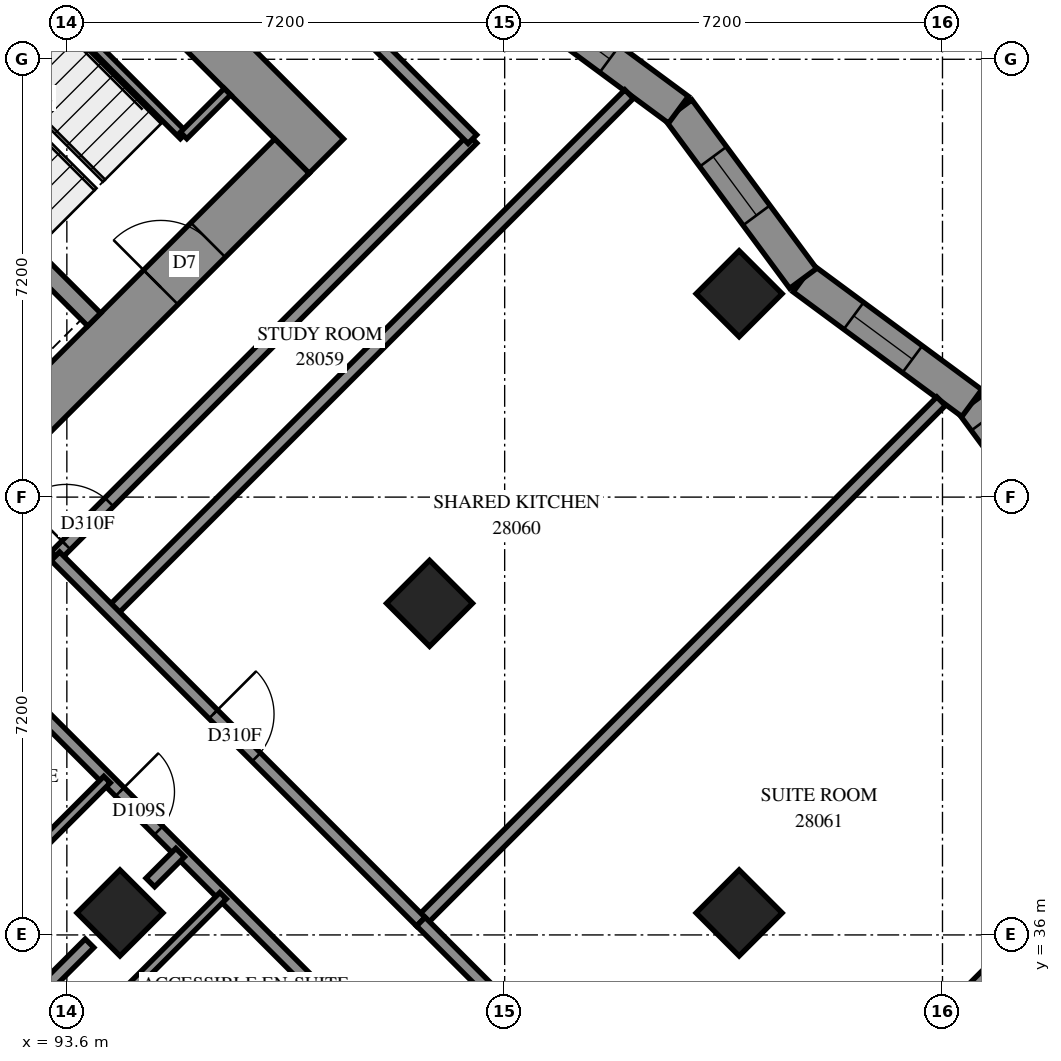
"""IFC4 building model, lengths in metres.
Left out: names, types, materials, properties, quantities, classifications, styles, units other than length and angle.
Written with IfcOpenShell. Run it as: python <this file> out.ifc"""

import sys

from ifc_helpers import new_model, si_unit, direction, frame, frame_2d, origin, origin_2d, place, context, subcontext, project, spatial, polyline, rectangle, outline, extrude, element, fill, save


model = new_model("IFC4")
c1 = context("Model", 3, precision=1e-05, world=origin(), true_north=direction((0.0, 1.0)))
c2 = subcontext(c1, "Body", "Model", "MODEL_VIEW")
j1 = project(units=[si_unit("LENGTHUNIT", "METRE"), si_unit("PLANEANGLEUNIT", "RADIAN")], contexts=[c1])
p1 = place(None, origin())
s1 = spatial("IfcSite", under=j1, at=p1, CompositionType="ELEMENT")
p2 = place(p1, origin())
s2 = spatial("IfcBuilding", under=s1, at=p2, CompositionType="ELEMENT")
p3 = place(p2, frame((0.0, 0.0, 105.0)))
s3 = spatial("IfcBuildingStorey", under=s2, at=p3, CompositionType="ELEMENT", Elevation=105.0)
for number, where, z_axis, x_axis in (
    (1, (104.656, 46.544, 0.0), (0.0, 0.0, 1.0), (0.707, -0.707, 0.0)),
    (2, (99.565, 41.453, 0.0), (0.0, 0.0, 1.0), (0.707, -0.707, 0.0)),
    (3, (94.474, 36.362, 0.0), (0.0, 0.0, 1.0), (0.707, -0.707, 0.0)),
    (4, (104.656, 36.362, 0.0), (0.0, 0.0, 1.0), (0.707, -0.707, 0.0)),
):
    element("IfcColumn", number, at=place(p3, frame(where, z_axis=z_axis, x_axis=x_axis)), inside=s3, PredefinedType="COLUMN", context=c2, shape_type="SweptSolid", body=[
        extrude(rectangle(XDim=1.0, YDim=1.0, at=origin_2d()), origin(), (0.0, 0.0, 1.0), 3.1),
    ])
p4 = place(p3, frame((86.554, 60.121, -0.3), z_axis=(0.0, 0.0, 1.0), x_axis=(0.7071067812, -0.7071067812, 0.0)))
e5 = element("IfcWall", 5, at=p4, inside=s3, PredefinedType="SHEAR", context=c2, shape_type="SweptSolid", body=[
    extrude(rectangle(XDim=16.0, YDim=0.8, at=frame_2d((8.0, 0.0))), origin(), (0.0, 0.0, 1.0), 2.7),
])
p5 = place(p4, frame((10.8, 0.0, 0.3)))
e6 = element("IfcOpeningElement", 6, at=p5, cuts=e5, PredefinedType="OPENING", context=c2, shape_type="SweptSolid", body=[
    extrude(rectangle(XDim=0.8, YDim=2.1, at=frame_2d((0.4, 1.05))), frame((0.0, 0.41, 0.0), z_axis=(0.0, -1.0, 0.0), x_axis=(1.0, 0.0, 0.0)), (0.0, 0.0, 1.0), 0.82),
])
p6 = place(p3, frame((87.12, 38.625, -0.3), z_axis=(0.0, 0.0, 1.0), x_axis=(0.7071067812, 0.7071067812, 0.0)))
e7 = element("IfcWall", 7, at=p6, inside=s3, PredefinedType="SHEAR", context=c2, shape_type="SweptSolid", body=[
    extrude(rectangle(XDim=14.4, YDim=0.8, at=frame_2d((7.2, 0.0))), origin(), (0.0, 0.0, 1.0), 2.7),
])
p7 = place(p6, frame((4.55, 0.0, 0.3)))
e8 = element("IfcOpeningElement", 8, at=p7, cuts=e7, PredefinedType="OPENING", context=c2, shape_type="SweptSolid", body=[
    extrude(rectangle(XDim=1.1, YDim=2.1, at=frame_2d((0.55, 1.05))), frame((0.0, 0.41, 0.0), z_axis=(0.0, -1.0, 0.0), x_axis=(1.0, 0.0, 0.0)), (0.0, 0.0, 1.0), 0.82),
])
p8 = place(p6, frame((11.35, 0.0, 0.3)))
e9 = element("IfcOpeningElement", 9, at=p8, cuts=e7, PredefinedType="OPENING", context=c2, shape_type="SweptSolid", body=[
    extrude(rectangle(XDim=1.1, YDim=2.1, at=frame_2d((0.55, 1.05))), frame((0.0, 0.41, 0.0), z_axis=(0.0, -1.0, 0.0), x_axis=(1.0, 0.0, 0.0)), (0.0, 0.0, 1.0), 0.82),
])
p9 = place(p3, frame((88.958, 51.211, 0.0), z_axis=(0.0, 0.0, 1.0), x_axis=(0.7070998367, -0.7071137256, 0.0)))
e10 = element("IfcWall", 10, at=p9, inside=s3, PredefinedType="SOLIDWALL", context=c2, shape_type="SweptSolid", body=[
    extrude(rectangle(XDim=7.2, YDim=0.3, at=frame_2d((3.6, 0.0))), origin(), (0.0, 0.0, 1.0), 3.1),
])
p10 = place(p3, frame((110.546, 41.952, 0.0), z_axis=(0.0, 0.0, 1.0), x_axis=(-0.5942955294, 0.8042467431, 0.0)))
e11 = element("IfcWall", 11, at=p10, inside=s3, PredefinedType="SOLIDWALL", context=c2, shape_type="SweptSolid", body=[
    extrude(outline(polyline([(0.065, -0.275), (3.514, -0.275), (3.432, 0.275), (-0.065, 0.275), (0.065, -0.275)])), origin(), (0.0, 0.0, 1.0), 3.1),
])
p11 = place(p10, frame((0.316, 0.0, 0.5)))
e12 = element("IfcOpeningElement", 12, at=p11, cuts=e11, PredefinedType="OPENING", context=c2, shape_type="SweptSolid", body=[
    extrude(rectangle(XDim=1.3, YDim=2.45, at=frame_2d((0.65, 1.225))), frame((0.0, 0.285, 0.0), z_axis=(0.0, -1.0, 0.0), x_axis=(1.0, 0.0, 0.0)), (0.0, 0.0, 1.0), 0.57),
])
p12 = place(p10, frame((1.816, 0.0, 0.5)))
e13 = element("IfcOpeningElement", 13, at=p12, cuts=e11, PredefinedType="OPENING", context=c2, shape_type="SweptSolid", body=[
    extrude(rectangle(XDim=1.3, YDim=2.45, at=frame_2d((0.65, 1.225))), frame((0.0, 0.285, 0.0), z_axis=(0.0, -1.0, 0.0), x_axis=(1.0, 0.0, 0.0)), (0.0, 0.0, 1.0), 0.57),
])
p13 = place(p3, frame((108.482, 44.746, 0.0), z_axis=(0.0, 0.0, 1.0), x_axis=(-0.8042309632, 0.5943168833, 0.0)))
e14 = element("IfcWall", 14, at=p13, inside=s3, PredefinedType="SOLIDWALL", context=c2, shape_type="SweptSolid", body=[
    extrude(outline(polyline([(-0.041, -0.275), (3.408, -0.275), (3.491, 0.275), (0.041, 0.275), (-0.041, -0.275)])), origin(), (0.0, 0.0, 1.0), 3.1),
])
p14 = place(p13, frame((1.216, 0.0, 0.5)))
e15 = element("IfcOpeningElement", 15, at=p14, cuts=e14, PredefinedType="OPENING", context=c2, shape_type="SweptSolid", body=[
    extrude(rectangle(XDim=1.2, YDim=2.45, at=frame_2d((0.6, 1.225))), frame((0.0, 0.285, 0.0), z_axis=(0.0, -1.0, 0.0), x_axis=(1.0, 0.0, 0.0)), (0.0, 0.0, 1.0), 0.57),
])
p15 = place(p3, frame((105.708, 46.796, 0.0), z_axis=(0.0, 0.0, 1.0), x_axis=(-0.5943307397, 0.8042207234, 0.0)))
e16 = element("IfcWall", 16, at=p15, inside=s3, PredefinedType="SOLIDWALL", context=c2, shape_type="SweptSolid", body=[
    extrude(outline(polyline([(0.041, -0.275), (3.491, -0.275), (3.408, 0.275), (-0.041, 0.275), (0.041, -0.275)])), origin(), (0.0, 0.0, 1.0), 3.1),
])
p16 = place(p15, frame((1.29, 0.0, 0.5)))
e17 = element("IfcOpeningElement", 17, at=p16, cuts=e16, PredefinedType="OPENING", context=c2, shape_type="SweptSolid", body=[
    extrude(rectangle(XDim=1.2, YDim=2.45, at=frame_2d((0.6, 1.225))), frame((0.0, 0.285, 0.0), z_axis=(0.0, -1.0, 0.0), x_axis=(1.0, 0.0, 0.0)), (0.0, 0.0, 1.0), 0.57),
])
p17 = place(p3, frame((103.658, 49.57, 0.0), z_axis=(0.0, 0.0, 1.0), x_axis=(-0.8042207234, 0.5943307397, 0.0)))
e18 = element("IfcWall", 18, at=p17, inside=s3, PredefinedType="SOLIDWALL", context=c2, shape_type="SweptSolid", body=[
    extrude(outline(polyline([(-0.041, -0.275), (3.408, -0.275), (3.491, 0.275), (0.041, 0.275), (-0.041, -0.275)])), origin(), (0.0, 0.0, 1.0), 3.1),
])
p18 = place(p17, frame((1.406, 0.0, 0.5)))
e19 = element("IfcOpeningElement", 19, at=p18, cuts=e18, PredefinedType="OPENING", context=c2, shape_type="SweptSolid", body=[
    extrude(rectangle(XDim=1.2, YDim=2.45, at=frame_2d((0.6, 1.225))), frame((0.0, 0.285, 0.0), z_axis=(0.0, -1.0, 0.0), x_axis=(1.0, 0.0, 0.0)), (0.0, 0.0, 1.0), 0.57),
])
p19 = place(p3, frame((91.313, 53.354, 0.0), z_axis=(0.0, 0.0, 1.0), x_axis=(0.7071067812, -0.7071067812, 0.0)))
e20 = element("IfcWall", 20, at=p19, inside=s3, PredefinedType="PARTITIONING", context=c2, shape_type="SweptSolid", body=[
    extrude(rectangle(XDim=5.95, YDim=0.15, at=frame_2d((2.975, 0.0))), origin(), (0.0, 0.0, 1.0), 3.1),
])
p20 = place(p3, frame((95.52, 49.146, 0.0), z_axis=(0.0, 0.0, 1.0), x_axis=(0.7071067812, 0.7071067812, 0.0)))
e21 = element("IfcWall", 21, at=p20, inside=s3, PredefinedType="PARTITIONING", context=c2, shape_type="SweptSolid", body=[
    extrude(rectangle(XDim=1.02, YDim=0.15, at=frame_2d((0.51, 0.0))), origin(), (0.0, 0.0, 1.0), 3.1),
])
p21 = place(p3, frame((92.004, 40.819, 0.0), z_axis=(0.0, 0.0, 1.0), x_axis=(0.7071067812, -0.7071067812, 0.0)))
e22 = element("IfcWall", 22, at=p21, inside=s3, PredefinedType="PARTITIONING", context=c2, shape_type="SweptSolid", body=[
    extrude(rectangle(XDim=19.298, YDim=0.2, at=frame_2d((9.649, 0.0))), origin(), (0.0, 0.0, 1.0), 3.1),
])
p22 = place(p21, frame((3.489, 0.0, 0.0)))
e23 = element("IfcOpeningElement", 23, at=p22, cuts=e22, PredefinedType="OPENING", context=c2, shape_type="SweptSolid", body=[
    extrude(rectangle(XDim=0.9, YDim=2.1, at=frame_2d((0.45, 1.05))), frame((0.0, 0.11, 0.0), z_axis=(0.0, -1.0, 0.0), x_axis=(1.0, 0.0, 0.0)), (0.0, 0.0, 1.0), 0.22),
])
p23 = place(p21, frame((9.319, 0.0, 0.0)))
e24 = element("IfcOpeningElement", 24, at=p23, cuts=e22, PredefinedType="OPENING", context=c2, shape_type="SweptSolid", body=[
    extrude(rectangle(XDim=0.9, YDim=2.1, at=frame_2d((0.45, 1.05))), frame((0.0, 0.11, 0.0), z_axis=(0.0, -1.0, 0.0), x_axis=(1.0, 0.0, 0.0)), (0.0, 0.0, 1.0), 0.22),
])
p24 = place(p21, frame((15.961, 0.0, 0.0)))
e25 = element("IfcOpeningElement", 25, at=p24, cuts=e22, PredefinedType="OPENING", context=c2, shape_type="SweptSolid", body=[
    extrude(rectangle(XDim=0.9, YDim=2.1, at=frame_2d((0.45, 1.05))), frame((0.0, 0.11, 0.0), z_axis=(0.0, -1.0, 0.0), x_axis=(1.0, 0.0, 0.0)), (0.0, 0.0, 1.0), 0.22),
])
p25 = place(p3, frame((99.423, 36.221, 0.0), z_axis=(0.0, 0.0, 1.0), x_axis=(0.7071067812, 0.7071067812, 0.0)))
e26 = element("IfcWall", 26, at=p25, inside=s3, PredefinedType="PARTITIONING", context=c2, shape_type="SweptSolid", body=[
    extrude(rectangle(XDim=12.099, YDim=0.2, at=frame_2d((6.049, 0.0))), origin(), (0.0, 0.0, 1.0), 3.1),
])
p26 = place(p3, frame((94.331, 41.313, 0.0), z_axis=(0.0, 0.0, 1.0), x_axis=(0.7071109333, 0.7071026291, 0.0)))
e27 = element("IfcWall", 27, at=p26, inside=s3, PredefinedType="PARTITIONING", context=c2, shape_type="SweptSolid", body=[
    extrude(rectangle(XDim=12.042, YDim=0.2, at=frame_2d((6.021, 0.0))), origin(), (0.0, 0.0, 1.0), 3.1),
])
p27 = place(p3, frame((93.413, 42.233, 0.0), z_axis=(0.0, 0.0, 1.0), x_axis=(0.7071067812, 0.7071067812, 0.0)))
e28 = element("IfcWall", 28, at=p27, inside=s3, PredefinedType="PARTITIONING", context=c2, shape_type="SweptSolid", body=[
    extrude(rectangle(XDim=9.699, YDim=0.2, at=frame_2d((4.849, 0.0))), origin(), (0.0, 0.0, 1.0), 3.1),
])
p28 = place(p27, frame((0.249, 0.0, 0.0)))
e29 = element("IfcOpeningElement", 29, at=p28, cuts=e28, PredefinedType="OPENING", context=c2, shape_type="SweptSolid", body=[
    extrude(rectangle(XDim=1.0, YDim=2.1, at=frame_2d((0.5, 1.05))), frame((0.0, 0.11, 0.0), z_axis=(0.0, -1.0, 0.0), x_axis=(1.0, 0.0, 0.0)), (0.0, 0.0, 1.0), 0.22),
])
p29 = place(p3, frame((93.411, 42.227, 0.0), z_axis=(0.0, 0.0, 1.0), x_axis=(0.7071067812, -0.7071067812, 0.0)))
e30 = element("IfcWall", 30, at=p29, inside=s3, PredefinedType="PARTITIONING", context=c2, shape_type="SweptSolid", body=[
    extrude(rectangle(XDim=8.499, YDim=0.2, at=frame_2d((4.25, 0.0))), origin(), (0.0, 0.0, 1.0), 3.1),
])
p30 = place(p29, frame((3.672, 0.0, 0.0)))
e31 = element("IfcOpeningElement", 31, at=p30, cuts=e30, PredefinedType="OPENING", context=c2, shape_type="SweptSolid", body=[
    extrude(rectangle(XDim=1.0, YDim=2.1, at=frame_2d((0.5, 1.05))), frame((0.0, 0.11, 0.0), z_axis=(0.0, -1.0, 0.0), x_axis=(1.0, 0.0, 0.0)), (0.0, 0.0, 1.0), 0.22),
])
p31 = place(p3, frame((96.097, 53.258, 0.0), z_axis=(0.0, 0.0, 1.0), x_axis=(0.7071067812, -0.7071067812, 0.0)))
e32 = element("IfcWall", 32, at=p31, inside=s3, PredefinedType="PARTITIONING", context=c2, shape_type="SweptSolid", body=[
    extrude(rectangle(XDim=5.9, YDim=0.2, at=frame_2d((2.95, 0.0))), origin(), (0.0, 0.0, 1.0), 3.1),
])
p32 = place(p31, frame((2.006, 0.0, 0.0)))
e33 = element("IfcOpeningElement", 33, at=p32, cuts=e32, PredefinedType="OPENING", context=c2, shape_type="SweptSolid", body=[
    extrude(rectangle(XDim=0.9, YDim=2.1, at=frame_2d((0.45, 1.05))), frame((0.0, 0.11, 0.0), z_axis=(0.0, -1.0, 0.0), x_axis=(1.0, 0.0, 0.0)), (0.0, 0.0, 1.0), 0.22),
])
p33 = place(p3, frame((89.881, 31.771, 0.0), z_axis=(0.0, 0.0, 1.0), x_axis=(0.7071067812, 0.7071067812, 0.0)))
e34 = element("IfcWall", 34, at=p33, inside=s3, PredefinedType="PARTITIONING", context=c2, shape_type="SweptSolid", body=[
    extrude(rectangle(XDim=5.787, YDim=0.2, at=frame_2d((2.893, 0.0))), origin(), (0.0, 0.0, 1.0), 3.1),
])
p34 = place(p3, frame((103.168, 32.47, 0.0), z_axis=(0.0, 0.0, 1.0), x_axis=(-0.7067858967, 0.7074275201, 0.0)))
e35 = element("IfcWall", 35, at=p34, inside=s3, PredefinedType="PARTITIONING", context=c2, shape_type="SweptSolid", body=[
    extrude(rectangle(XDim=5.299, YDim=0.2, at=frame_2d((2.65, 0.0))), origin(), (0.0, 0.0, 1.0), 3.1),
])
p35 = place(p34, frame((2.043, 0.0, 0.0)))
e36 = element("IfcOpeningElement", 36, at=p35, cuts=e35, PredefinedType="OPENING", context=c2, shape_type="SweptSolid", body=[
    extrude(rectangle(XDim=0.9, YDim=2.1, at=frame_2d((0.45, 1.05))), frame((0.0, 0.11, 0.0), z_axis=(0.0, -1.0, 0.0), x_axis=(1.0, 0.0, 0.0)), (0.0, 0.0, 1.0), 0.22),
])
p36 = place(p3, frame((106.211, 32.827, 0.0), z_axis=(0.0, 0.0, 1.0), x_axis=(0.7071067812, 0.7071067812, 0.0)))
e37 = element("IfcWall", 37, at=p36, inside=s3, PredefinedType="PARTITIONING", context=c2, shape_type="SweptSolid", body=[
    extrude(rectangle(XDim=4.45, YDim=0.2, at=frame_2d((2.225, 0.0))), origin(), (0.0, 0.0, 1.0), 3.1),
])
p37 = place(p3, frame((92.563, 36.857, 0.0), z_axis=(0.0, 0.0, 1.0), x_axis=(0.7071067812, 0.7071067812, 0.0)))
e38 = element("IfcWall", 38, at=p37, inside=s3, PredefinedType="PARTITIONING", context=c2, shape_type="SweptSolid", body=[
    extrude(rectangle(XDim=2.401, YDim=0.15, at=frame_2d((1.201, 0.0))), origin(), (0.0, 0.0, 1.0), 3.1),
])
p38 = place(p3, frame((94.473, 34.949, 0.0), z_axis=(0.0, 0.0, 1.0), x_axis=(0.7071067812, 0.7071067812, 0.0)))
e39 = element("IfcWall", 39, at=p38, inside=s3, PredefinedType="PARTITIONING", context=c2, shape_type="SweptSolid", body=[
    extrude(rectangle(XDim=2.398, YDim=0.15, at=frame_2d((1.199, 0.0))), origin(), (0.0, 0.0, 1.0), 3.1),
])
p39 = place(p3, frame((94.973, 36.863, 0.0), z_axis=(0.0, 0.0, 1.0), x_axis=(0.7071067812, 0.7071067812, 0.0)))
e40 = element("IfcWall", 40, at=p39, inside=s3, PredefinedType="PARTITIONING", context=c2, shape_type="SweptSolid", body=[
    extrude(rectangle(XDim=0.693, YDim=0.2, at=frame_2d((0.346, 0.0))), origin(), (0.0, 0.0, 1.0), 3.1),
])
p40 = place(p12, origin())
e41 = element("IfcWindow", 41, at=p40, inside=s3, PartitioningType="SINGLE_PANEL", PredefinedType="WINDOW", context=c2, shape_type="SweptSolid", body=[
    extrude(rectangle(XDim=1.3, YDim=2.45, at=frame_2d((0.65, 1.225))), frame((0.0, 0.155, 0.0), z_axis=(0.0, -1.0, 0.0), x_axis=(1.0, 0.0, 0.0)), (0.0, 0.0, 1.0), 0.06),
])
fill(e13, e41)
p41 = place(p14, origin())
e42 = element("IfcWindow", 42, at=p41, inside=s3, PartitioningType="SINGLE_PANEL", PredefinedType="WINDOW", context=c2, shape_type="SweptSolid", body=[
    extrude(rectangle(XDim=1.2, YDim=2.45, at=frame_2d((0.6, 1.225))), frame((0.0, 0.155, 0.0), z_axis=(0.0, -1.0, 0.0), x_axis=(1.0, 0.0, 0.0)), (0.0, 0.0, 1.0), 0.06),
])
fill(e15, e42)
p42 = place(p16, origin())
e43 = element("IfcWindow", 43, at=p42, inside=s3, PartitioningType="SINGLE_PANEL", PredefinedType="WINDOW", context=c2, shape_type="SweptSolid", body=[
    extrude(rectangle(XDim=1.2, YDim=2.45, at=frame_2d((0.6, 1.225))), frame((0.0, 0.155, 0.0), z_axis=(0.0, -1.0, 0.0), x_axis=(1.0, 0.0, 0.0)), (0.0, 0.0, 1.0), 0.06),
])
fill(e17, e43)
p43 = place(p18, origin())
e44 = element("IfcWindow", 44, at=p43, inside=s3, PartitioningType="SINGLE_PANEL", PredefinedType="WINDOW", context=c2, shape_type="SweptSolid", body=[
    extrude(rectangle(XDim=1.2, YDim=2.45, at=frame_2d((0.6, 1.225))), frame((0.0, 0.155, 0.0), z_axis=(0.0, -1.0, 0.0), x_axis=(1.0, 0.0, 0.0)), (0.0, 0.0, 1.0), 0.06),
])
fill(e19, e44)
p44 = place(p8, origin())
e45 = element("IfcDoor", 45, at=p44, inside=s3, OperationType="SINGLE_SWING_RIGHT", PredefinedType="DOOR", context=c2, shape_type="SweptSolid", body=[
    extrude(rectangle(XDim=1.1, YDim=2.1, at=frame_2d((0.55, 1.05))), frame((0.0, 0.025, 0.0), z_axis=(0.0, -1.0, 0.0), x_axis=(1.0, 0.0, 0.0)), (0.0, 0.0, 1.0), 0.05),
])
fill(e9, e45)
p45 = place(p28, origin())
e46 = element("IfcDoor", 46, at=p45, inside=s3, OperationType="SINGLE_SWING_LEFT", PredefinedType="DOOR", context=c2, shape_type="SweptSolid", body=[
    extrude(rectangle(XDim=1.0, YDim=2.1, at=frame_2d((0.5, 1.05))), frame((0.0, 0.025, 0.0), z_axis=(0.0, -1.0, 0.0), x_axis=(1.0, 0.0, 0.0)), (0.0, 0.0, 1.0), 0.05),
])
fill(e29, e46)
p46 = place(p30, origin())
e47 = element("IfcDoor", 47, at=p46, inside=s3, OperationType="SINGLE_SWING_RIGHT", PredefinedType="DOOR", context=c2, shape_type="SweptSolid", body=[
    extrude(rectangle(XDim=1.0, YDim=2.1, at=frame_2d((0.5, 1.05))), frame((0.0, 0.025, 0.0), z_axis=(0.0, -1.0, 0.0), x_axis=(1.0, 0.0, 0.0)), (0.0, 0.0, 1.0), 0.05),
])
fill(e31, e47)
p47 = place(p22, origin())
e48 = element("IfcDoor", 48, at=p47, inside=s3, OperationType="SINGLE_SWING_LEFT", PredefinedType="DOOR", context=c2, shape_type="SweptSolid", body=[
    extrude(rectangle(XDim=0.9, YDim=2.1, at=frame_2d((0.45, 1.05))), frame((0.0, 0.025, 0.0), z_axis=(0.0, -1.0, 0.0), x_axis=(1.0, 0.0, 0.0)), (0.0, 0.0, 1.0), 0.05),
])
fill(e23, e48)
save(model, sys.argv[1])
